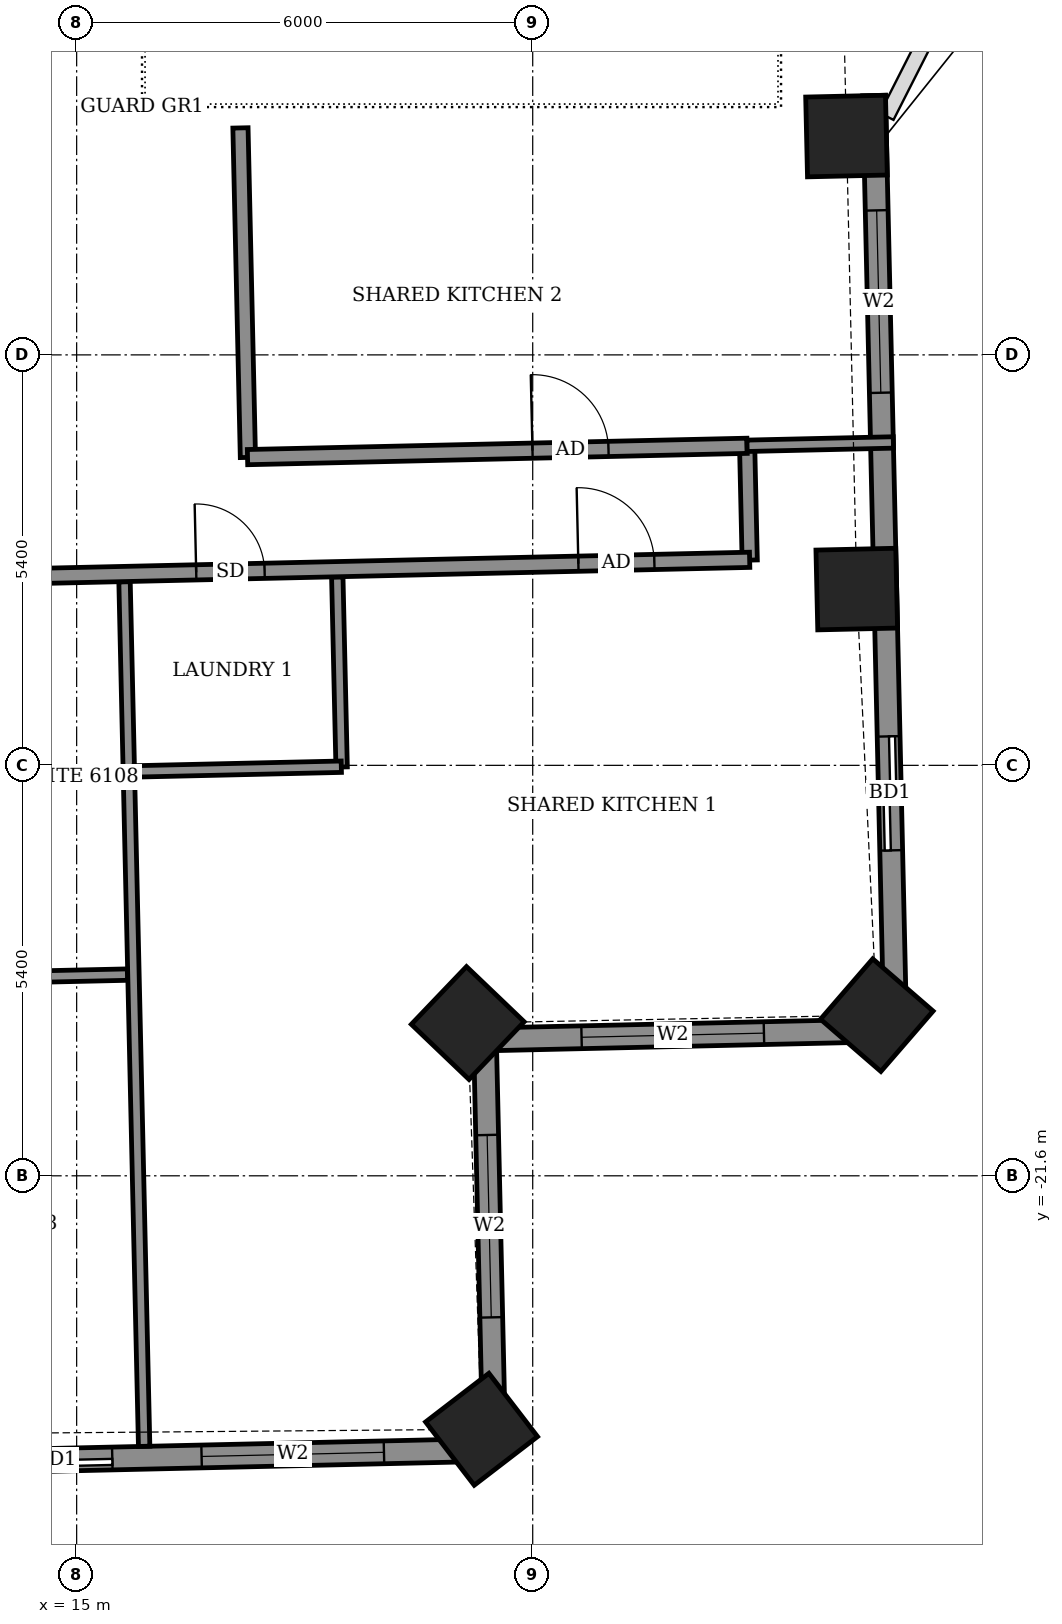
"""IFC4 building model, lengths in metres.
Left out: names, types, materials, properties, quantities, classifications, styles, units other than length and angle.
Written with IfcOpenShell. Run it as: python <this file> out.ifc"""

import sys

from ifc_helpers import new_model, si_unit, direction, frame, frame_2d, origin, origin_2d, place, context, subcontext, project, spatial, rectangle, extrude, element, fill, save


model = new_model("IFC4")
c1 = context("Model", 3, precision=1e-05, world=origin(), true_north=direction((0.0, 1.0)))
c2 = subcontext(c1, "Body", "Model", "MODEL_VIEW")
j1 = project(units=[si_unit("LENGTHUNIT", "METRE"), si_unit("PLANEANGLEUNIT", "RADIAN")], contexts=[c1])
p1 = place(None, origin())
s1 = spatial("IfcSite", under=j1, at=p1, CompositionType="ELEMENT")
p2 = place(p1, origin())
s2 = spatial("IfcBuilding", under=s1, at=p2, CompositionType="ELEMENT")
p3 = place(p2, frame((0.0, 0.0, 241.9)))
s3 = spatial("IfcBuildingStorey", under=s2, at=p3, CompositionType="ELEMENT", Elevation=241.9)
for number, where, z_axis, x_axis in (
    (1, (20.327, -24.935, -0.55), (0.0, 0.0, 1.0), (0.793, 0.609, 0.0)),
    (2, (20.146, -19.59, -0.55), (0.0, 0.0, 1.0), (0.691, 0.723, 0.0)),
    (3, (25.527, -19.487, -0.55), (0.0, 0.0, 1.0), (0.654, 0.756, 0.0)),
    (4, (25.263, -13.881, -0.55), (0.0, 0.0, 1.0), (-0.023, 1.0, 0.0)),
    (5, (25.128, -7.921, -0.55), (0.0, 0.0, 1.0), (-0.023, 1.0, 0.0)),
):
    element("IfcColumn", number, at=place(p3, frame(where, z_axis=z_axis, x_axis=x_axis)), inside=s3, PredefinedType="COLUMN", context=c2, shape_type="SweptSolid", body=[
        extrude(rectangle(XDim=1.05, YDim=1.05, at=origin_2d()), origin(), (0.0, 0.0, 1.0), 3.6),
    ])
p4 = place(p3, frame((25.77, -19.684, 0.0), z_axis=(0.0, 0.0, 1.0), x_axis=(-0.022688489476, 0.999742583091, 0.0)))
e6 = element("IfcWall", 6, at=p4, inside=s3, PredefinedType="SOLIDWALL", context=c2, shape_type="SweptSolid", body=[
    extrude(rectangle(XDim=12.299, YDim=0.3, at=frame_2d((6.15, 0.0))), origin(), (0.0, 0.0, 1.0), 2.55),
])
p5 = place(p4, frame((2.366, 0.0, 0.0)))
e7 = element("IfcOpeningElement", 7, at=p5, cuts=e6, PredefinedType="OPENING", context=c2, shape_type="SweptSolid", body=[
    extrude(rectangle(XDim=1.5, YDim=2.4, at=frame_2d((0.75, 1.2))), frame((0.0, 0.16, 0.0), z_axis=(0.0, -1.0, 0.0), x_axis=(1.0, 0.0, 0.0)), (0.0, 0.0, 1.0), 0.32),
])
p6 = place(p4, frame((8.388, 0.0, 0.9)))
e8 = element("IfcOpeningElement", 8, at=p6, cuts=e6, PredefinedType="OPENING", context=c2, shape_type="SweptSolid", body=[
    extrude(rectangle(XDim=2.4, YDim=1.5, at=frame_2d((1.2, 0.75))), frame((0.0, 0.16, 0.0), z_axis=(0.0, -1.0, 0.0), x_axis=(1.0, 0.0, 0.0)), (0.0, 0.0, 1.0), 0.32),
])
p7 = place(p3, frame((-23.403, -26.201, 0.0), z_axis=(0.0, 0.0, 1.0), x_axis=(0.999742770494, 0.022680230258, 0.0)))
e9 = element("IfcWall", 9, at=p7, inside=s3, PredefinedType="SOLIDWALL", context=c2, shape_type="SweptSolid", body=[
    extrude(rectangle(XDim=43.908, YDim=0.3, at=frame_2d((21.954, 0.0))), origin(), (0.0, 0.0, 1.0), 2.55),
])
p8 = place(p7, frame((1.951, 0.0, 0.0)))
e10 = element("IfcOpeningElement", 10, at=p8, cuts=e9, PredefinedType="OPENING", context=c2, shape_type="SweptSolid", body=[
    extrude(rectangle(XDim=1.5, YDim=2.4, at=frame_2d((0.75, 1.2))), frame((0.0, 0.16, 0.0), z_axis=(0.0, -1.0, 0.0), x_axis=(1.0, 0.0, 0.0)), (0.0, 0.0, 1.0), 0.32),
])
p9 = place(p7, frame((5.272, 0.0, 0.0)))
e11 = element("IfcOpeningElement", 11, at=p9, cuts=e9, PredefinedType="OPENING", context=c2, shape_type="SweptSolid", body=[
    extrude(rectangle(XDim=1.2, YDim=2.4, at=frame_2d((0.6, 1.2))), frame((0.0, 0.16, 0.0), z_axis=(0.0, -1.0, 0.0), x_axis=(1.0, 0.0, 0.0)), (0.0, 0.0, 1.0), 0.32),
])
p10 = place(p7, frame((10.475, 0.0, 0.0)))
e12 = element("IfcOpeningElement", 12, at=p10, cuts=e9, PredefinedType="OPENING", context=c2, shape_type="SweptSolid", body=[
    extrude(rectangle(XDim=1.5, YDim=2.4, at=frame_2d((0.75, 1.2))), frame((0.0, 0.16, 0.0), z_axis=(0.0, -1.0, 0.0), x_axis=(1.0, 0.0, 0.0)), (0.0, 0.0, 1.0), 0.32),
])
p11 = place(p7, frame((15.53, 0.0, 0.0)))
e13 = element("IfcOpeningElement", 13, at=p11, cuts=e9, PredefinedType="OPENING", context=c2, shape_type="SweptSolid", body=[
    extrude(rectangle(XDim=1.5, YDim=2.4, at=frame_2d((0.75, 1.2))), frame((0.0, 0.16, 0.0), z_axis=(0.0, -1.0, 0.0), x_axis=(1.0, 0.0, 0.0)), (0.0, 0.0, 1.0), 0.32),
])
p12 = place(p7, frame((18.939, 0.0, 0.0)))
e14 = element("IfcOpeningElement", 14, at=p12, cuts=e9, PredefinedType="OPENING", context=c2, shape_type="SweptSolid", body=[
    extrude(rectangle(XDim=1.5, YDim=2.4, at=frame_2d((0.75, 1.2))), frame((0.0, 0.16, 0.0), z_axis=(0.0, -1.0, 0.0), x_axis=(1.0, 0.0, 0.0)), (0.0, 0.0, 1.0), 0.32),
])
p13 = place(p7, frame((23.489, 0.0, 0.0)))
e15 = element("IfcOpeningElement", 15, at=p13, cuts=e9, PredefinedType="OPENING", context=c2, shape_type="SweptSolid", body=[
    extrude(rectangle(XDim=1.5, YDim=2.4, at=frame_2d((0.75, 1.2))), frame((0.0, 0.16, 0.0), z_axis=(0.0, -1.0, 0.0), x_axis=(1.0, 0.0, 0.0)), (0.0, 0.0, 1.0), 0.32),
])
p14 = place(p7, frame((26.898, 0.0, 0.0)))
e16 = element("IfcOpeningElement", 16, at=p14, cuts=e9, PredefinedType="OPENING", context=c2, shape_type="SweptSolid", body=[
    extrude(rectangle(XDim=1.5, YDim=2.4, at=frame_2d((0.75, 1.2))), frame((0.0, 0.16, 0.0), z_axis=(0.0, -1.0, 0.0), x_axis=(1.0, 0.0, 0.0)), (0.0, 0.0, 1.0), 0.32),
])
p15 = place(p7, frame((32.05, 0.0, 0.0)))
e17 = element("IfcOpeningElement", 17, at=p15, cuts=e9, PredefinedType="OPENING", context=c2, shape_type="SweptSolid", body=[
    extrude(rectangle(XDim=1.5, YDim=2.4, at=frame_2d((0.75, 1.2))), frame((0.0, 0.16, 0.0), z_axis=(0.0, -1.0, 0.0), x_axis=(1.0, 0.0, 0.0)), (0.0, 0.0, 1.0), 0.32),
])
p16 = place(p7, frame((37.382, 0.0, 0.0)))
e18 = element("IfcOpeningElement", 18, at=p16, cuts=e9, PredefinedType="OPENING", context=c2, shape_type="SweptSolid", body=[
    extrude(rectangle(XDim=1.5, YDim=2.4, at=frame_2d((0.75, 1.2))), frame((0.0, 0.16, 0.0), z_axis=(0.0, -1.0, 0.0), x_axis=(1.0, 0.0, 0.0)), (0.0, 0.0, 1.0), 0.32),
])
p17 = place(p7, frame((40.057, 0.0, 0.9)))
e19 = element("IfcOpeningElement", 19, at=p17, cuts=e9, PredefinedType="OPENING", context=c2, shape_type="SweptSolid", body=[
    extrude(rectangle(XDim=2.4, YDim=1.5, at=frame_2d((1.2, 0.75))), frame((0.0, 0.16, 0.0), z_axis=(0.0, -1.0, 0.0), x_axis=(1.0, 0.0, 0.0)), (0.0, 0.0, 1.0), 0.32),
])
p18 = place(p3, frame((20.494, -25.205, 0.0), z_axis=(0.0, 0.0, 1.0), x_axis=(-0.022558128916, 0.999745533033, 0.0)))
e20 = element("IfcWall", 20, at=p18, inside=s3, PredefinedType="SOLIDWALL", context=c2, shape_type="SweptSolid", body=[
    extrude(rectangle(XDim=5.401, YDim=0.3, at=frame_2d((2.7, 0.0))), origin(), (0.0, 0.0, 1.0), 2.55),
])
p19 = place(p18, frame((1.743, 0.0, 0.9)))
e21 = element("IfcOpeningElement", 21, at=p19, cuts=e20, PredefinedType="OPENING", context=c2, shape_type="SweptSolid", body=[
    extrude(rectangle(XDim=2.4, YDim=1.5, at=frame_2d((1.2, 0.75))), frame((0.0, 0.16, 0.0), z_axis=(0.0, -1.0, 0.0), x_axis=(1.0, 0.0, 0.0)), (0.0, 0.0, 1.0), 0.32),
])
p20 = place(p3, frame((20.372, -19.806, 0.0), z_axis=(0.0, 0.0, 1.0), x_axis=(0.999745417973, 0.02256322766, 0.0)))
e22 = element("IfcWall", 22, at=p20, inside=s3, PredefinedType="SOLIDWALL", context=c2, shape_type="SweptSolid", body=[
    extrude(rectangle(XDim=5.399, YDim=0.3, at=frame_2d((2.7, 0.0))), origin(), (0.0, 0.0, 1.0), 2.55),
])
p21 = place(p20, frame((1.271, 0.0, 0.9)))
e23 = element("IfcOpeningElement", 23, at=p21, cuts=e22, PredefinedType="OPENING", context=c2, shape_type="SweptSolid", body=[
    extrude(rectangle(XDim=2.4, YDim=1.5, at=frame_2d((1.2, 0.75))), frame((0.0, 0.16, 0.0), z_axis=(0.0, -1.0, 0.0), x_axis=(1.0, 0.0, 0.0)), (0.0, 0.0, 1.0), 0.32),
])
p22 = place(p3, frame((15.888, -25.159, 0.0), z_axis=(0.0, 0.0, 1.0), x_axis=(-0.022684355347, 0.999742676904, 0.0)))
e24 = element("IfcWall", 24, at=p22, inside=s3, PredefinedType="PARTITIONING", context=c2, shape_type="SweptSolid", body=[
    extrude(rectangle(XDim=11.376, YDim=0.15, at=frame_2d((5.688, 0.0))), origin(), (0.0, 0.0, 1.0), 2.55),
])
p23 = place(p3, frame((13.344, -19.005, 0.0), z_axis=(0.0, 0.0, 1.0), x_axis=(0.999749744571, 0.022370700241, 0.0)))
e25 = element("IfcWall", 25, at=p23, inside=s3, PredefinedType="PARTITIONING", context=c2, shape_type="SweptSolid", body=[
    extrude(rectangle(XDim=2.324, YDim=0.15, at=frame_2d((1.162, 0.0))), origin(), (0.0, 0.0, 1.0), 3.05),
])
p24 = place(p3, frame((18.486, -16.222, 0.0), z_axis=(0.0, 0.0, 1.0), x_axis=(-0.022854521249, 0.999738801317, 0.0)))
e26 = element("IfcWall", 26, at=p24, inside=s3, PredefinedType="PARTITIONING", context=c2, shape_type="SweptSolid", body=[
    extrude(rectangle(XDim=2.5, YDim=0.15, at=frame_2d((1.25, 0.0))), origin(), (0.0, 0.0, 1.0), 3.05),
])
p25 = place(p3, frame((15.757, -16.28, 0.0), z_axis=(0.0, 0.0, 1.0), x_axis=(0.99974114142, 0.022751926344, 0.0)))
e27 = element("IfcWall", 27, at=p25, inside=s3, PredefinedType="PARTITIONING", context=c2, shape_type="SweptSolid", body=[
    extrude(rectangle(XDim=2.726, YDim=0.15, at=frame_2d((1.363, 0.0))), origin(), (0.0, 0.0, 1.0), 3.05),
])
p26 = place(p3, frame((23.855, -13.5, 0.0), z_axis=(0.0, 0.0, 1.0), x_axis=(-0.022617910375, 0.999744182344, 0.0)))
e28 = element("IfcWall", 28, at=p26, inside=s3, PredefinedType="PARTITIONING", context=c2, shape_type="SweptSolid", body=[
    extrude(rectangle(XDim=1.5, YDim=0.2, at=frame_2d((0.75, 0.0))), origin(), (0.0, 0.0, 1.0), 3.05),
])
p27 = place(p3, frame((-27.016, -14.65, 0.0), z_axis=(0.0, 0.0, 1.0), x_axis=(0.999742874861, 0.022675629315, 0.0)))
e29 = element("IfcWall", 29, at=p27, inside=s3, PredefinedType="PARTITIONING", context=c2, shape_type="SweptSolid", body=[
    extrude(rectangle(XDim=50.883, YDim=0.2, at=frame_2d((25.442, 0.0))), origin(), (0.0, 0.0, 1.0), 3.05),
])
p28 = place(p27, frame((1.575, 0.0, 0.0)))
e30 = element("IfcOpeningElement", 30, at=p28, cuts=e29, PredefinedType="OPENING", context=c2, shape_type="SweptSolid", body=[
    extrude(rectangle(XDim=1.0, YDim=2.1, at=frame_2d((0.5, 1.05))), frame((0.0, 0.11, 0.0), z_axis=(0.0, -1.0, 0.0), x_axis=(1.0, 0.0, 0.0)), (0.0, 0.0, 1.0), 0.22),
])
p29 = place(p27, frame((6.4, 0.0, 0.0)))
e31 = element("IfcOpeningElement", 31, at=p29, cuts=e29, PredefinedType="OPENING", context=c2, shape_type="SweptSolid", body=[
    extrude(rectangle(XDim=0.9, YDim=2.1, at=frame_2d((0.45, 1.05))), frame((0.0, 0.11, 0.0), z_axis=(0.0, -1.0, 0.0), x_axis=(1.0, 0.0, 0.0)), (0.0, 0.0, 1.0), 0.22),
])
p30 = place(p27, frame((11.025, 0.0, 0.0)))
e32 = element("IfcOpeningElement", 32, at=p30, cuts=e29, PredefinedType="OPENING", context=c2, shape_type="SweptSolid", body=[
    extrude(rectangle(XDim=0.9, YDim=2.1, at=frame_2d((0.45, 1.05))), frame((0.0, 0.11, 0.0), z_axis=(0.0, -1.0, 0.0), x_axis=(1.0, 0.0, 0.0)), (0.0, 0.0, 1.0), 0.22),
])
p31 = place(p27, frame((12.925, 0.0, 0.0)))
e33 = element("IfcOpeningElement", 33, at=p31, cuts=e29, PredefinedType="OPENING", context=c2, shape_type="SweptSolid", body=[
    extrude(rectangle(XDim=0.9, YDim=2.1, at=frame_2d((0.45, 1.05))), frame((0.0, 0.11, 0.0), z_axis=(0.0, -1.0, 0.0), x_axis=(1.0, 0.0, 0.0)), (0.0, 0.0, 1.0), 0.22),
])
p32 = place(p27, frame((19.65, 0.0, 0.0)))
e34 = element("IfcOpeningElement", 34, at=p32, cuts=e29, PredefinedType="OPENING", context=c2, shape_type="SweptSolid", body=[
    extrude(rectangle(XDim=0.9, YDim=2.1, at=frame_2d((0.45, 1.05))), frame((0.0, 0.11, 0.0), z_axis=(0.0, -1.0, 0.0), x_axis=(1.0, 0.0, 0.0)), (0.0, 0.0, 1.0), 0.22),
])
p33 = place(p27, frame((21.575, 0.0, 0.0)))
e35 = element("IfcOpeningElement", 35, at=p33, cuts=e29, PredefinedType="OPENING", context=c2, shape_type="SweptSolid", body=[
    extrude(rectangle(XDim=0.9, YDim=2.1, at=frame_2d((0.45, 1.05))), frame((0.0, 0.11, 0.0), z_axis=(0.0, -1.0, 0.0), x_axis=(1.0, 0.0, 0.0)), (0.0, 0.0, 1.0), 0.22),
])
p34 = place(p27, frame((28.25, 0.0, 0.0)))
e36 = element("IfcOpeningElement", 36, at=p34, cuts=e29, PredefinedType="OPENING", context=c2, shape_type="SweptSolid", body=[
    extrude(rectangle(XDim=0.9, YDim=2.1, at=frame_2d((0.45, 1.05))), frame((0.0, 0.11, 0.0), z_axis=(0.0, -1.0, 0.0), x_axis=(1.0, 0.0, 0.0)), (0.0, 0.0, 1.0), 0.22),
])
p35 = place(p27, frame((30.125, 0.0, 0.0)))
e37 = element("IfcOpeningElement", 37, at=p35, cuts=e29, PredefinedType="OPENING", context=c2, shape_type="SweptSolid", body=[
    extrude(rectangle(XDim=0.9, YDim=2.1, at=frame_2d((0.45, 1.05))), frame((0.0, 0.11, 0.0), z_axis=(0.0, -1.0, 0.0), x_axis=(1.0, 0.0, 0.0)), (0.0, 0.0, 1.0), 0.22),
])
p36 = place(p27, frame((36.9, 0.0, 0.0)))
e38 = element("IfcOpeningElement", 38, at=p36, cuts=e29, PredefinedType="OPENING", context=c2, shape_type="SweptSolid", body=[
    extrude(rectangle(XDim=0.9, YDim=2.1, at=frame_2d((0.45, 1.05))), frame((0.0, 0.11, 0.0), z_axis=(0.0, -1.0, 0.0), x_axis=(1.0, 0.0, 0.0)), (0.0, 0.0, 1.0), 0.22),
])
p37 = place(p27, frame((38.85, 0.0, 0.0)))
e39 = element("IfcOpeningElement", 39, at=p37, cuts=e29, PredefinedType="OPENING", context=c2, shape_type="SweptSolid", body=[
    extrude(rectangle(XDim=0.9, YDim=2.1, at=frame_2d((0.45, 1.05))), frame((0.0, 0.11, 0.0), z_axis=(0.0, -1.0, 0.0), x_axis=(1.0, 0.0, 0.0)), (0.0, 0.0, 1.0), 0.22),
])
p38 = place(p27, frame((48.629, 0.0, 0.0)))
e40 = element("IfcOpeningElement", 40, at=p38, cuts=e29, PredefinedType="OPENING", context=c2, shape_type="SweptSolid", body=[
    extrude(rectangle(XDim=1.0, YDim=2.1, at=frame_2d((0.5, 1.05))), frame((0.0, 0.11, 0.0), z_axis=(0.0, -1.0, 0.0), x_axis=(1.0, 0.0, 0.0)), (0.0, 0.0, 1.0), 0.22),
])
p39 = place(p27, frame((43.6, 0.0, 0.0)))
e41 = element("IfcOpeningElement", 41, at=p39, cuts=e29, PredefinedType="OPENING", context=c2, shape_type="SweptSolid", body=[
    extrude(rectangle(XDim=0.9, YDim=2.1, at=frame_2d((0.45, 1.05))), frame((0.0, 0.11, 0.0), z_axis=(0.0, -1.0, 0.0), x_axis=(1.0, 0.0, 0.0)), (0.0, 0.0, 1.0), 0.22),
])
p40 = place(p3, frame((17.253, -12.149, 0.0), z_axis=(0.0, 0.0, 1.0), x_axis=(-0.022578158225, 0.999745080894, 0.0)))
e42 = element("IfcWall", 42, at=p40, inside=s3, PredefinedType="PARTITIONING", context=c2, shape_type="SweptSolid", body=[
    extrude(rectangle(XDim=4.336, YDim=0.2, at=frame_2d((2.168, 0.0))), origin(), (0.0, 0.0, 1.0), 3.05),
])
p41 = place(p3, frame((17.248, -12.145, 0.0), z_axis=(0.0, 0.0, 1.0), x_axis=(0.999743348025, 0.022654758434, 0.0)))
e43 = element("IfcWall", 43, at=p41, inside=s3, PredefinedType="PARTITIONING", context=c2, shape_type="SweptSolid", body=[
    extrude(rectangle(XDim=6.574, YDim=0.2, at=frame_2d((3.287, 0.0))), origin(), (0.0, 0.0, 1.0), 3.05),
])
p42 = place(p41, frame((3.75, 0.0, 0.0)))
e44 = element("IfcOpeningElement", 44, at=p42, cuts=e43, PredefinedType="OPENING", context=c2, shape_type="SweptSolid", body=[
    extrude(rectangle(XDim=1.0, YDim=2.1, at=frame_2d((0.5, 1.05))), frame((0.0, 0.11, 0.0), z_axis=(0.0, -1.0, 0.0), x_axis=(1.0, 0.0, 0.0)), (0.0, 0.0, 1.0), 0.22),
])
p43 = place(p3, frame((23.82, -11.996, 0.0), z_axis=(0.0, 0.0, 1.0), x_axis=(0.999736638572, 0.02294893235, 0.0)))
e45 = element("IfcWall", 45, at=p43, inside=s3, PredefinedType="PARTITIONING", context=c2, shape_type="SweptSolid", body=[
    extrude(rectangle(XDim=1.926, YDim=0.15, at=frame_2d((0.963, 0.0))), origin(), (0.0, 0.0, 1.0), 2.55),
])
p44 = place(p5, origin())
e46 = element("IfcDoor", 46, at=p44, inside=s3, OperationType="SLIDING_TO_LEFT", PredefinedType="DOOR", context=c2, shape_type="SweptSolid", body=[
    extrude(rectangle(XDim=1.5, YDim=2.4, at=frame_2d((0.75, 1.2))), frame((0.0, 0.025, 0.0), z_axis=(0.0, -1.0, 0.0), x_axis=(1.0, 0.0, 0.0)), (0.0, 0.0, 1.0), 0.05),
])
fill(e7, e46)
p45 = place(p6, origin())
e47 = element("IfcWindow", 47, at=p45, inside=s3, PartitioningType="DOUBLE_PANEL_VERTICAL", PredefinedType="WINDOW", context=c2, shape_type="SweptSolid", body=[
    extrude(rectangle(XDim=2.4, YDim=1.5, at=frame_2d((1.2, 0.75))), frame((0.0, 0.03, 0.0), z_axis=(0.0, -1.0, 0.0), x_axis=(1.0, 0.0, 0.0)), (0.0, 0.0, 1.0), 0.06),
])
fill(e8, e47)
p46 = place(p16, origin())
e48 = element("IfcDoor", 48, at=p46, inside=s3, OperationType="SLIDING_TO_LEFT", PredefinedType="DOOR", context=c2, shape_type="SweptSolid", body=[
    extrude(rectangle(XDim=1.5, YDim=2.4, at=frame_2d((0.75, 1.2))), frame((0.0, 0.025, 0.0), z_axis=(0.0, -1.0, 0.0), x_axis=(1.0, 0.0, 0.0)), (0.0, 0.0, 1.0), 0.05),
])
fill(e18, e48)
p47 = place(p17, origin())
e49 = element("IfcWindow", 49, at=p47, inside=s3, PartitioningType="DOUBLE_PANEL_VERTICAL", PredefinedType="WINDOW", context=c2, shape_type="SweptSolid", body=[
    extrude(rectangle(XDim=2.4, YDim=1.5, at=frame_2d((1.2, 0.75))), frame((0.0, 0.03, 0.0), z_axis=(0.0, -1.0, 0.0), x_axis=(1.0, 0.0, 0.0)), (0.0, 0.0, 1.0), 0.06),
])
fill(e19, e49)
p48 = place(p19, origin())
e50 = element("IfcWindow", 50, at=p48, inside=s3, PartitioningType="DOUBLE_PANEL_VERTICAL", PredefinedType="WINDOW", context=c2, shape_type="SweptSolid", body=[
    extrude(rectangle(XDim=2.4, YDim=1.5, at=frame_2d((1.2, 0.75))), frame((0.0, 0.03, 0.0), z_axis=(0.0, -1.0, 0.0), x_axis=(1.0, 0.0, 0.0)), (0.0, 0.0, 1.0), 0.06),
])
fill(e21, e50)
p49 = place(p21, origin())
e51 = element("IfcWindow", 51, at=p49, inside=s3, PartitioningType="DOUBLE_PANEL_VERTICAL", PredefinedType="WINDOW", context=c2, shape_type="SweptSolid", body=[
    extrude(rectangle(XDim=2.4, YDim=1.5, at=frame_2d((1.2, 0.75))), frame((0.0, 0.03, 0.0), z_axis=(0.0, -1.0, 0.0), x_axis=(1.0, 0.0, 0.0)), (0.0, 0.0, 1.0), 0.06),
])
fill(e23, e51)
p50 = place(p38, origin())
e52 = element("IfcDoor", 52, at=p50, inside=s3, OperationType="SINGLE_SWING_RIGHT", PredefinedType="DOOR", context=c2, shape_type="SweptSolid", body=[
    extrude(rectangle(XDim=1.0, YDim=2.1, at=frame_2d((0.5, 1.05))), frame((0.0, 0.025, 0.0), z_axis=(0.0, -1.0, 0.0), x_axis=(1.0, 0.0, 0.0)), (0.0, 0.0, 1.0), 0.05),
])
fill(e40, e52)
p51 = place(p39, origin())
e53 = element("IfcDoor", 53, at=p51, inside=s3, OperationType="SINGLE_SWING_RIGHT", PredefinedType="DOOR", context=c2, shape_type="SweptSolid", body=[
    extrude(rectangle(XDim=0.9, YDim=2.1, at=frame_2d((0.45, 1.05))), frame((0.0, 0.025, 0.0), z_axis=(0.0, -1.0, 0.0), x_axis=(1.0, 0.0, 0.0)), (0.0, 0.0, 1.0), 0.05),
])
fill(e41, e53)
p52 = place(p42, origin())
e54 = element("IfcDoor", 54, at=p52, inside=s3, OperationType="SINGLE_SWING_LEFT", PredefinedType="DOOR", context=c2, shape_type="SweptSolid", body=[
    extrude(rectangle(XDim=1.0, YDim=2.1, at=frame_2d((0.5, 1.05))), frame((0.0, 0.025, 0.0), z_axis=(0.0, -1.0, 0.0), x_axis=(1.0, 0.0, 0.0)), (0.0, 0.0, 1.0), 0.05),
])
fill(e44, e54)
save(model, sys.argv[1])
